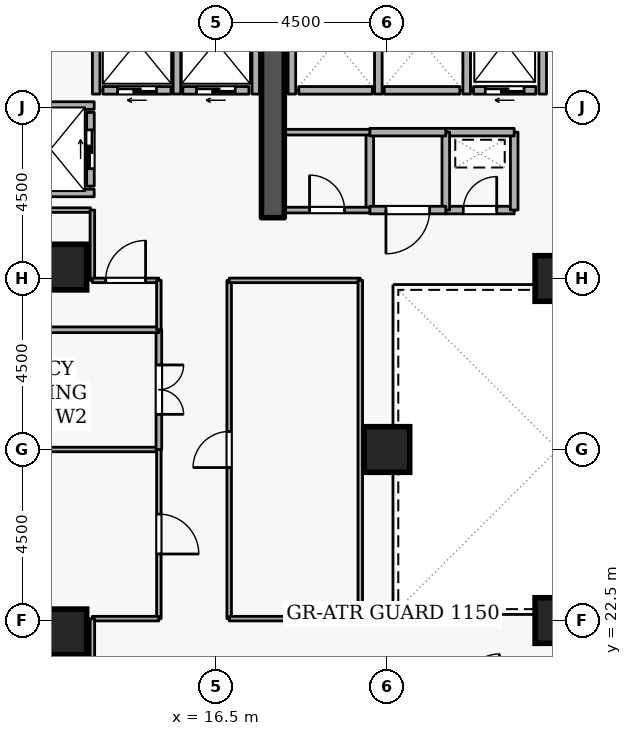
"""IFC4 building model, lengths in metres.
Left out: names, types, materials, properties, quantities, classifications, styles, units other than length and angle.
Written with IfcOpenShell. Run it as: python <this file> out.ifc"""

import sys

from ifc_helpers import new_model, si_unit, direction, frame, frame_2d, origin, origin_2d, place, context, subcontext, project, spatial, rectangle, extrude, element, fill, save


model = new_model("IFC4")
c1 = context("Model", 3, precision=1e-05, world=origin(), true_north=direction((0.0, 1.0)))
c2 = subcontext(c1, "Body", "Model", "MODEL_VIEW")
j1 = project(units=[si_unit("LENGTHUNIT", "METRE"), si_unit("PLANEANGLEUNIT", "RADIAN")], contexts=[c1])
p1 = place(None, origin())
s1 = spatial("IfcSite", under=j1, at=p1, CompositionType="ELEMENT")
p2 = place(p1, origin())
s2 = spatial("IfcBuilding", under=s1, at=p2, CompositionType="ELEMENT")
p3 = place(p2, frame((0.0, 0.0, 112.5)))
s3 = spatial("IfcBuildingStorey", under=s2, at=p3, CompositionType="ELEMENT", Elevation=112.5)
p4 = place(p3, frame((18.0, 33.1, 0.0), z_axis=(0.0, 0.0, 1.0), x_axis=(0.0, 1.0, 0.0)))
e1 = element("IfcWall", 1, at=p4, inside=s3, PredefinedType="SHEAR", context=c2, shape_type="SweptSolid", body=[
    extrude(rectangle(XDim=5.7, YDim=0.6, at=frame_2d((2.85, 0.0))), origin(), (0.0, 0.0, 1.0), 3.6),
])
for number, where, z_axis, x_axis in (
    (2, (12.5, 22.2, 0.0), (0.0, 0.0, 1.0), (1.0, 0.0, 0.0)),
    (3, (12.5, 31.8, 0.0), (0.0, 0.0, 1.0), (1.0, 0.0, 0.0)),
    (4, (25.5, 22.5, 0.0), (0.0, 0.0, 1.0), (1.0, 0.0, 0.0)),
    (5, (25.5, 31.5, 0.0), (0.0, 0.0, 1.0), (1.0, 0.0, 0.0)),
    (6, (21.0, 27.0, 0.0), (0.0, 0.0, 1.0), (1.0, 0.0, 0.0)),
):
    element("IfcColumn", number, at=place(p3, frame(where, z_axis=z_axis, x_axis=x_axis)), inside=s3, PredefinedType="COLUMN", context=c2, shape_type="SweptSolid", body=[
        extrude(rectangle(XDim=1.2, YDim=1.2, at=origin_2d()), origin(), (0.0, 0.0, 1.0), 3.6),
    ])
p5 = place(p3, frame((24.92, 36.45, 0.0), z_axis=(0.0, 0.0, 1.0), x_axis=(-1.0, 0.0, 0.0)))
e7 = element("IfcWall", 7, at=p5, inside=s3, PredefinedType="STANDARD", context=c2, shape_type="SweptSolid", body=[
    extrude(rectangle(XDim=1.64, YDim=0.2, at=frame_2d((0.82, 0.0))), origin(), (0.0, 0.0, 1.0), 3.34),
])
p6 = place(p5, frame((0.31, 0.0, 0.0)))
e8 = element("IfcOpeningElement", 8, at=p6, cuts=e7, PredefinedType="OPENING", context=c2, shape_type="SweptSolid", body=[
    extrude(rectangle(XDim=1.02, YDim=2.06, at=frame_2d((0.51, 1.03))), frame((0.0, 0.11, 0.0), z_axis=(0.0, -1.0, 0.0), x_axis=(1.0, 0.0, 0.0)), (0.0, 0.0, 1.0), 0.22),
])
p7 = place(p3, frame((22.92, 36.45, 0.0), z_axis=(0.0, 0.0, 1.0), x_axis=(-1.0, 0.0, 0.0)))
e9 = element("IfcWall", 9, at=p7, inside=s3, PredefinedType="STANDARD", context=c2, shape_type="SweptSolid", body=[
    extrude(rectangle(XDim=1.99, YDim=0.2, at=frame_2d((0.995, 0.0))), origin(), (0.0, 0.0, 1.0), 3.34),
])
p8 = place(p3, frame((20.62, 36.45, 0.0), z_axis=(0.0, 0.0, 1.0), x_axis=(-1.0, 0.0, 0.0)))
e10 = element("IfcWall", 10, at=p8, inside=s3, PredefinedType="STANDARD", context=c2, shape_type="SweptSolid", body=[
    extrude(rectangle(XDim=1.94, YDim=0.2, at=frame_2d((0.97, 0.0))), origin(), (0.0, 0.0, 1.0), 3.34),
])
p9 = place(p3, frame((17.37, 36.45, 0.0), z_axis=(0.0, 0.0, 1.0), x_axis=(-1.0, 0.0, 0.0)))
e11 = element("IfcWall", 11, at=p9, inside=s3, PredefinedType="STANDARD", context=c2, shape_type="SweptSolid", body=[
    extrude(rectangle(XDim=1.74, YDim=0.2, at=frame_2d((0.87, 0.0))), origin(), (0.0, 0.0, 1.0), 3.34),
])
p10 = place(p9, frame((0.36, 0.0, 0.0)))
e12 = element("IfcOpeningElement", 12, at=p10, cuts=e11, PredefinedType="OPENING", context=c2, shape_type="SweptSolid", body=[
    extrude(rectangle(XDim=1.02, YDim=2.06, at=frame_2d((0.51, 1.03))), frame((0.0, 0.11, 0.0), z_axis=(0.0, -1.0, 0.0), x_axis=(1.0, 0.0, 0.0)), (0.0, 0.0, 1.0), 0.22),
])
p11 = place(p3, frame((15.32, 36.45, 0.0), z_axis=(0.0, 0.0, 1.0), x_axis=(-1.0, 0.0, 0.0)))
e13 = element("IfcWall", 13, at=p11, inside=s3, PredefinedType="STANDARD", context=c2, shape_type="SweptSolid", body=[
    extrude(rectangle(XDim=1.79, YDim=0.2, at=frame_2d((0.895, 0.0))), origin(), (0.0, 0.0, 1.0), 3.34),
])
p12 = place(p11, frame((0.385, 0.0, 0.0)))
e14 = element("IfcOpeningElement", 14, at=p12, cuts=e13, PredefinedType="OPENING", context=c2, shape_type="SweptSolid", body=[
    extrude(rectangle(XDim=1.02, YDim=2.06, at=frame_2d((0.51, 1.03))), frame((0.0, 0.11, 0.0), z_axis=(0.0, -1.0, 0.0), x_axis=(1.0, 0.0, 0.0)), (0.0, 0.0, 1.0), 0.22),
])
p13 = place(p3, frame((13.2, 33.93, 0.0), z_axis=(0.0, 0.0, 1.0), x_axis=(0.0, 1.0, 0.0)))
e15 = element("IfcWall", 15, at=p13, inside=s3, PredefinedType="STANDARD", context=c2, shape_type="SweptSolid", body=[
    extrude(rectangle(XDim=1.94, YDim=0.2, at=frame_2d((0.97, 0.0))), origin(), (0.0, 0.0, 1.0), 3.34),
])
p14 = place(p13, frame((0.46, 0.0, 0.0)))
e16 = element("IfcOpeningElement", 16, at=p14, cuts=e15, PredefinedType="OPENING", context=c2, shape_type="SweptSolid", body=[
    extrude(rectangle(XDim=1.02, YDim=2.06, at=frame_2d((0.51, 1.03))), frame((0.0, 0.11, 0.0), z_axis=(0.0, -1.0, 0.0), x_axis=(1.0, 0.0, 0.0)), (0.0, 0.0, 1.0), 0.22),
])
for number, where, z_axis, x_axis in (
    (17, (25.1, 36.352, 0.0), (0.0, 0.0, 1.0), (0.0, 1.0, 0.0)),
    (18, (23.1, 36.352, 0.0), (0.0, 0.0, 1.0), (0.0, 1.0, 0.0)),
    (19, (20.775, 36.352, 0.0), (0.0, 0.0, 1.0), (0.0, 1.0, 0.0)),
    (20, (18.5, 36.352, 0.0), (0.0, 0.0, 1.0), (0.0, 1.0, 0.0)),
):
    element("IfcWall", number, at=place(p3, frame(where, z_axis=z_axis, x_axis=x_axis)), inside=s3, PredefinedType="STANDARD", context=c2, shape_type="SweptSolid", body=[
        extrude(rectangle(XDim=2.436, YDim=0.2, at=frame_2d((1.218, 0.0))), origin(), (0.0, 0.0, 1.0), 3.34),
    ])
p15 = place(p3, frame((17.55, 36.352, 0.0), z_axis=(0.0, 0.0, 1.0), x_axis=(0.0, 1.0, 0.0)))
e21 = element("IfcWall", 21, at=p15, inside=s3, PredefinedType="STANDARD", context=c2, shape_type="SweptSolid", body=[
    extrude(rectangle(XDim=2.636, YDim=0.2, at=frame_2d((1.318, 0.0))), origin(), (0.0, 0.0, 1.0), 2.545),
])
for number, where, z_axis, x_axis in (
    (22, (15.475, 36.352, 0.0), (0.0, 0.0, 1.0), (0.0, 1.0, 0.0)),
    (23, (13.35, 36.352, 0.0), (0.0, 0.0, 1.0), (0.0, 1.0, 0.0)),
):
    element("IfcWall", number, at=place(p3, frame(where, z_axis=z_axis, x_axis=x_axis)), inside=s3, PredefinedType="STANDARD", context=c2, shape_type="SweptSolid", body=[
        extrude(rectangle(XDim=2.636, YDim=0.2, at=frame_2d((1.318, 0.0))), origin(), (0.0, 0.0, 1.0), 3.34),
    ])
for number, where, z_axis, x_axis in (
    (24, (11.002, 36.05, 0.0), (0.0, 0.0, 1.0), (1.0, 0.0, 0.0)),
    (25, (11.002, 33.75, 0.0), (0.0, 0.0, 1.0), (1.0, 0.0, 0.0)),
):
    element("IfcWall", number, at=place(p3, frame(where, z_axis=z_axis, x_axis=x_axis)), inside=s3, PredefinedType="STANDARD", context=c2, shape_type="SweptSolid", body=[
        extrude(rectangle(XDim=2.296, YDim=0.2, at=frame_2d((1.148, 0.0))), origin(), (0.0, 0.0, 1.0), 3.34),
    ])
p16 = place(p3, frame((22.55, 33.3, 0.0), z_axis=(0.0, 0.0, 1.0), x_axis=(1.0, 0.0, 0.0)))
e26 = element("IfcWall", 26, at=p16, inside=s3, PredefinedType="STANDARD", context=c2, shape_type="SweptSolid", body=[
    extrude(rectangle(XDim=1.8, YDim=0.2, at=frame_2d((0.9, 0.0))), origin(), (0.0, 0.0, 1.0), 3.34),
])
p17 = place(p16, frame((0.46, 0.0, 0.0)))
e27 = element("IfcOpeningElement", 27, at=p17, cuts=e26, PredefinedType="OPENING", context=c2, shape_type="SweptSolid", body=[
    extrude(rectangle(XDim=0.88, YDim=2.04, at=frame_2d((0.44, 1.02))), frame((0.0, 0.11, 0.0), z_axis=(0.0, -1.0, 0.0), x_axis=(1.0, 0.0, 0.0)), (0.0, 0.0, 1.0), 0.22),
])
p18 = place(p3, frame((24.35, 33.3, 0.0), z_axis=(0.0, 0.0, 1.0), x_axis=(0.0, 1.0, 0.0)))
e28 = element("IfcWall", 28, at=p18, inside=s3, PredefinedType="STANDARD", context=c2, shape_type="SweptSolid", body=[
    extrude(rectangle(XDim=2.05, YDim=0.2, at=frame_2d((1.025, 0.0))), origin(), (0.0, 0.0, 1.0), 3.34),
])
p19 = place(p3, frame((24.35, 35.35, 0.0), z_axis=(0.0, 0.0, 1.0), x_axis=(-1.0, 0.0, 0.0)))
e29 = element("IfcWall", 29, at=p19, inside=s3, PredefinedType="STANDARD", context=c2, shape_type="SweptSolid", body=[
    extrude(rectangle(XDim=1.8, YDim=0.2, at=frame_2d((0.9, 0.0))), origin(), (0.0, 0.0, 1.0), 3.34),
])
for number, where, z_axis, x_axis in (
    (30, (22.55, 35.35, 0.0), (0.0, 0.0, 1.0), (0.0, -1.0, 0.0)),
    (31, (20.55, 33.3, 0.0), (0.0, 0.0, 1.0), (0.0, 1.0, 0.0)),
):
    element("IfcWall", number, at=place(p3, frame(where, z_axis=z_axis, x_axis=x_axis)), inside=s3, PredefinedType="STANDARD", context=c2, shape_type="SweptSolid", body=[
        extrude(rectangle(XDim=2.05, YDim=0.2, at=frame_2d((1.025, 0.0))), origin(), (0.0, 0.0, 1.0), 3.34),
    ])
p20 = place(p3, frame((20.55, 35.35, 0.0), z_axis=(0.0, 0.0, 1.0), x_axis=(1.0, 0.0, 0.0)))
e32 = element("IfcWall", 32, at=p20, inside=s3, PredefinedType="STANDARD", context=c2, shape_type="SweptSolid", body=[
    extrude(rectangle(XDim=2.0, YDim=0.2, at=frame_2d((1.0, 0.0))), origin(), (0.0, 0.0, 1.0), 3.34),
])
p21 = place(p3, frame((22.55, 33.3, 0.0), z_axis=(0.0, 0.0, 1.0), x_axis=(-1.0, 0.0, 0.0)))
e33 = element("IfcWall", 33, at=p21, inside=s3, PredefinedType="STANDARD", context=c2, shape_type="SweptSolid", body=[
    extrude(rectangle(XDim=2.0, YDim=0.2, at=frame_2d((1.0, 0.0))), origin(), (0.0, 0.0, 1.0), 3.34),
])
p22 = place(p21, frame((0.425, 0.0, 0.0)))
e34 = element("IfcOpeningElement", 34, at=p22, cuts=e33, PredefinedType="OPENING", context=c2, shape_type="SweptSolid", body=[
    extrude(rectangle(XDim=1.15, YDim=2.1, at=frame_2d((0.575, 1.05))), frame((0.0, 0.11, 0.0), z_axis=(0.0, -1.0, 0.0), x_axis=(1.0, 0.0, 0.0)), (0.0, 0.0, 1.0), 0.22),
])
p23 = place(p3, frame((18.3, 33.3, 0.0), z_axis=(0.0, 0.0, 1.0), x_axis=(1.0, 0.0, 0.0)))
e35 = element("IfcWall", 35, at=p23, inside=s3, PredefinedType="PARTITIONING", context=c2, shape_type="SweptSolid", body=[
    extrude(rectangle(XDim=2.25, YDim=0.15, at=frame_2d((1.125, 0.0))), origin(), (0.0, 0.0, 1.0), 3.34),
])
p24 = place(p23, frame((0.665, 0.0, 0.0)))
e36 = element("IfcOpeningElement", 36, at=p24, cuts=e35, PredefinedType="OPENING", context=c2, shape_type="SweptSolid", body=[
    extrude(rectangle(XDim=0.92, YDim=2.08, at=frame_2d((0.46, 1.04))), frame((0.0, 0.085, 0.0), z_axis=(0.0, -1.0, 0.0), x_axis=(1.0, 0.0, 0.0)), (0.0, 0.0, 1.0), 0.17),
])
p25 = place(p3, frame((20.55, 35.35, 0.0), z_axis=(0.0, 0.0, 1.0), x_axis=(-1.0, 0.0, 0.0)))
e37 = element("IfcWall", 37, at=p25, inside=s3, PredefinedType="PARTITIONING", context=c2, shape_type="SweptSolid", body=[
    extrude(rectangle(XDim=2.25, YDim=0.15, at=frame_2d((1.125, 0.0))), origin(), (0.0, 0.0, 1.0), 3.34),
])
p26 = place(p3, frame((8.2, 27.0, 0.0), z_axis=(0.0, 0.0, 1.0), x_axis=(1.0, 0.0, 0.0)))
e38 = element("IfcWall", 38, at=p26, inside=s3, PredefinedType="PARTITIONING", context=c2, shape_type="SweptSolid", body=[
    extrude(rectangle(XDim=6.8, YDim=0.12, at=frame_2d((3.4, 0.0))), origin(), (0.0, 0.0, 1.0), 2.882),
])
p27 = place(p3, frame((15.0, 27.0, 0.0), z_axis=(0.0, 0.0, 1.0), x_axis=(0.0, -1.0, 0.0)))
e39 = element("IfcWall", 39, at=p27, inside=s3, PredefinedType="PARTITIONING", context=c2, shape_type="SweptSolid", body=[
    extrude(rectangle(XDim=4.45, YDim=0.12, at=frame_2d((2.225, 0.0))), origin(), (0.0, 0.0, 1.0), 3.34),
])
p28 = place(p27, frame((1.7, 0.0, 0.0)))
e40 = element("IfcOpeningElement", 40, at=p28, cuts=e39, PredefinedType="OPENING", context=c2, shape_type="SweptSolid", body=[
    extrude(rectangle(XDim=1.05, YDim=2.1, at=frame_2d((0.525, 1.05))), frame((0.0, 0.07, 0.0), z_axis=(0.0, -1.0, 0.0), x_axis=(1.0, 0.0, 0.0)), (0.0, 0.0, 1.0), 0.14),
])
p29 = place(p3, frame((15.0, 22.55, 0.0), z_axis=(0.0, 0.0, 1.0), x_axis=(-1.0, 0.0, 0.0)))
e41 = element("IfcWall", 41, at=p29, inside=s3, PredefinedType="PARTITIONING", context=c2, shape_type="SweptSolid", body=[
    extrude(rectangle(XDim=1.75, YDim=0.12, at=frame_2d((0.875, 0.0))), origin(), (0.0, 0.0, 1.0), 3.34),
])
p30 = place(p3, frame((13.25, 22.55, 0.0), z_axis=(0.0, 0.0, 1.0), x_axis=(0.0, -1.0, 0.0)))
e42 = element("IfcWall", 42, at=p30, inside=s3, PredefinedType="PARTITIONING", context=c2, shape_type="SweptSolid", body=[
    extrude(rectangle(XDim=1.85, YDim=0.12, at=frame_2d((0.925, 0.0))), origin(), (0.0, 0.0, 1.0), 3.34),
])
p31 = place(p3, frame((15.0, 30.15, 0.0), z_axis=(0.0, 0.0, 1.0), x_axis=(0.0, -1.0, 0.0)))
e43 = element("IfcWall", 43, at=p31, inside=s3, PredefinedType="PARTITIONING", context=c2, shape_type="SweptSolid", body=[
    extrude(rectangle(XDim=3.15, YDim=0.15, at=frame_2d((1.575, 0.0))), origin(), (0.0, 0.0, 1.0), 3.34),
])
p32 = place(p31, frame((0.925, 0.0, 0.0)))
e44 = element("IfcOpeningElement", 44, at=p32, cuts=e43, PredefinedType="OPENING", context=c2, shape_type="SweptSolid", body=[
    extrude(rectangle(XDim=1.3, YDim=2.12, at=frame_2d((0.65, 1.06))), frame((0.0, 0.085, 0.0), z_axis=(0.0, -1.0, 0.0), x_axis=(1.0, 0.0, 0.0)), (0.0, 0.0, 1.0), 0.17),
])
p33 = place(p3, frame((1.58, 30.15, 0.0), z_axis=(0.0, 0.0, 1.0), x_axis=(1.0, 0.0, 0.0)))
e45 = element("IfcWall", 45, at=p33, inside=s3, PredefinedType="PARTITIONING", context=c2, shape_type="SweptSolid", body=[
    extrude(rectangle(XDim=13.42, YDim=0.15, at=frame_2d((6.71, 0.0))), origin(), (0.0, 0.0, 1.0), 3.34),
])
p34 = place(p3, frame((10.9, 33.3, 0.0), z_axis=(0.0, 0.0, 1.0), x_axis=(1.0, 0.0, 0.0)))
e46 = element("IfcWall", 46, at=p34, inside=s3, PredefinedType="PARTITIONING", context=c2, shape_type="SweptSolid", body=[
    extrude(rectangle(XDim=2.3, YDim=0.12, at=frame_2d((1.15, 0.0))), origin(), (0.0, 0.0, 1.0), 3.34),
])
p35 = place(p3, frame((13.25, 33.3, 0.0), z_axis=(0.0, 0.0, 1.0), x_axis=(0.0, -1.0, 0.0)))
e47 = element("IfcWall", 47, at=p35, inside=s3, PredefinedType="PARTITIONING", context=c2, shape_type="SweptSolid", body=[
    extrude(rectangle(XDim=1.85, YDim=0.12, at=frame_2d((0.925, 0.0))), origin(), (0.0, 0.0, 1.0), 3.34),
])
p36 = place(p3, frame((13.25, 31.45, 0.0), z_axis=(0.0, 0.0, 1.0), x_axis=(1.0, 0.0, 0.0)))
e48 = element("IfcWall", 48, at=p36, inside=s3, PredefinedType="PARTITIONING", context=c2, shape_type="SweptSolid", body=[
    extrude(rectangle(XDim=1.75, YDim=0.12, at=frame_2d((0.875, 0.0))), origin(), (0.0, 0.0, 1.0), 3.34),
])
p37 = place(p36, frame((0.35, 0.0, 0.0)))
e49 = element("IfcOpeningElement", 49, at=p37, cuts=e48, PredefinedType="OPENING", context=c2, shape_type="SweptSolid", body=[
    extrude(rectangle(XDim=1.05, YDim=2.1, at=frame_2d((0.525, 1.05))), frame((0.0, 0.07, 0.0), z_axis=(0.0, -1.0, 0.0), x_axis=(1.0, 0.0, 0.0)), (0.0, 0.0, 1.0), 0.14),
])
p38 = place(p3, frame((15.0, 31.45, 0.0), z_axis=(0.0, 0.0, 1.0), x_axis=(0.0, -1.0, 0.0)))
e50 = element("IfcWall", 50, at=p38, inside=s3, PredefinedType="PARTITIONING", context=c2, shape_type="SweptSolid", body=[
    extrude(rectangle(XDim=1.3, YDim=0.12, at=frame_2d((0.65, 0.0))), origin(), (0.0, 0.0, 1.0), 3.34),
])
p39 = place(p3, frame((16.85, 22.55, 0.0), z_axis=(0.0, 0.0, 1.0), x_axis=(0.0, 1.0, 0.0)))
e51 = element("IfcWall", 51, at=p39, inside=s3, PredefinedType="PARTITIONING", context=c2, shape_type="SweptSolid", body=[
    extrude(rectangle(XDim=8.9, YDim=0.12, at=frame_2d((4.45, 0.0))), origin(), (0.0, 0.0, 1.0), 3.34),
])
p40 = place(p39, frame((3.975, 0.0, 0.0)))
e52 = element("IfcOpeningElement", 52, at=p40, cuts=e51, PredefinedType="OPENING", context=c2, shape_type="SweptSolid", body=[
    extrude(rectangle(XDim=0.95, YDim=2.1, at=frame_2d((0.475, 1.05))), frame((0.0, 0.07, 0.0), z_axis=(0.0, -1.0, 0.0), x_axis=(1.0, 0.0, 0.0)), (0.0, 0.0, 1.0), 0.14),
])
p41 = place(p3, frame((16.85, 31.45, 0.0), z_axis=(0.0, 0.0, 1.0), x_axis=(1.0, 0.0, 0.0)))
e53 = element("IfcWall", 53, at=p41, inside=s3, PredefinedType="PARTITIONING", context=c2, shape_type="SweptSolid", body=[
    extrude(rectangle(XDim=3.45, YDim=0.12, at=frame_2d((1.725, 0.0))), origin(), (0.0, 0.0, 1.0), 3.34),
])
p42 = place(p3, frame((20.3, 31.45, 0.0), z_axis=(0.0, 0.0, 1.0), x_axis=(0.0, -1.0, 0.0)))
e54 = element("IfcWall", 54, at=p42, inside=s3, PredefinedType="PARTITIONING", context=c2, shape_type="SweptSolid", body=[
    extrude(rectangle(XDim=8.9, YDim=0.12, at=frame_2d((4.45, 0.0))), origin(), (0.0, 0.0, 1.0), 3.34),
])
p43 = place(p3, frame((20.3, 22.55, 0.0), z_axis=(0.0, 0.0, 1.0), x_axis=(-1.0, 0.0, 0.0)))
e55 = element("IfcWall", 55, at=p43, inside=s3, PredefinedType="PARTITIONING", context=c2, shape_type="SweptSolid", body=[
    extrude(rectangle(XDim=3.45, YDim=0.12, at=frame_2d((1.725, 0.0))), origin(), (0.0, 0.0, 1.0), 3.34),
])
p44 = place(p6, origin())
e56 = element("IfcDoor", 56, at=p44, inside=s3, OperationType="SLIDING_TO_LEFT", PredefinedType="DOOR", context=c2, shape_type="SweptSolid", body=[
    extrude(rectangle(XDim=1.02, YDim=2.06, at=frame_2d((0.51, 1.03))), frame((0.0, 0.025, 0.0), z_axis=(0.0, -1.0, 0.0), x_axis=(1.0, 0.0, 0.0)), (0.0, 0.0, 1.0), 0.05),
])
fill(e8, e56)
p45 = place(p10, origin())
e57 = element("IfcDoor", 57, at=p45, inside=s3, OperationType="SLIDING_TO_LEFT", PredefinedType="DOOR", context=c2, shape_type="SweptSolid", body=[
    extrude(rectangle(XDim=1.02, YDim=2.06, at=frame_2d((0.51, 1.03))), frame((0.0, 0.025, 0.0), z_axis=(0.0, -1.0, 0.0), x_axis=(1.0, 0.0, 0.0)), (0.0, 0.0, 1.0), 0.05),
])
fill(e12, e57)
p46 = place(p12, origin())
e58 = element("IfcDoor", 58, at=p46, inside=s3, OperationType="SLIDING_TO_LEFT", PredefinedType="DOOR", context=c2, shape_type="SweptSolid", body=[
    extrude(rectangle(XDim=1.02, YDim=2.06, at=frame_2d((0.51, 1.03))), frame((0.0, 0.025, 0.0), z_axis=(0.0, -1.0, 0.0), x_axis=(1.0, 0.0, 0.0)), (0.0, 0.0, 1.0), 0.05),
])
fill(e14, e58)
p47 = place(p14, origin())
e59 = element("IfcDoor", 59, at=p47, inside=s3, OperationType="SLIDING_TO_LEFT", PredefinedType="DOOR", context=c2, shape_type="SweptSolid", body=[
    extrude(rectangle(XDim=1.02, YDim=2.06, at=frame_2d((0.51, 1.03))), frame((0.0, 0.025, 0.0), z_axis=(0.0, -1.0, 0.0), x_axis=(1.0, 0.0, 0.0)), (0.0, 0.0, 1.0), 0.05),
])
fill(e16, e59)
p48 = place(p17, origin())
e60 = element("IfcDoor", 60, at=p48, inside=s3, OperationType="SINGLE_SWING_RIGHT", PredefinedType="DOOR", context=c2, shape_type="SweptSolid", body=[
    extrude(rectangle(XDim=0.88, YDim=2.04, at=frame_2d((0.44, 1.02))), frame((0.0, 0.025, 0.0), z_axis=(0.0, -1.0, 0.0), x_axis=(1.0, 0.0, 0.0)), (0.0, 0.0, 1.0), 0.05),
])
fill(e27, e60)
p49 = place(p24, origin())
e61 = element("IfcDoor", 61, at=p49, inside=s3, OperationType="SINGLE_SWING_LEFT", PredefinedType="DOOR", context=c2, shape_type="SweptSolid", body=[
    extrude(rectangle(XDim=0.92, YDim=2.08, at=frame_2d((0.46, 1.04))), frame((0.0, 0.025, 0.0), z_axis=(0.0, -1.0, 0.0), x_axis=(1.0, 0.0, 0.0)), (0.0, 0.0, 1.0), 0.05),
])
fill(e36, e61)
p50 = place(p22, origin())
e62 = element("IfcDoor", 62, at=p50, inside=s3, OperationType="SINGLE_SWING_RIGHT", PredefinedType="DOOR", context=c2, shape_type="SweptSolid", body=[
    extrude(rectangle(XDim=1.15, YDim=2.1, at=frame_2d((0.575, 1.05))), frame((0.0, 0.025, 0.0), z_axis=(0.0, -1.0, 0.0), x_axis=(1.0, 0.0, 0.0)), (0.0, 0.0, 1.0), 0.05),
])
fill(e34, e62)
p51 = place(p28, origin())
e63 = element("IfcDoor", 63, at=p51, inside=s3, OperationType="SINGLE_SWING_RIGHT", PredefinedType="DOOR", context=c2, shape_type="SweptSolid", body=[
    extrude(rectangle(XDim=1.05, YDim=2.1, at=frame_2d((0.525, 1.05))), frame((0.0, 0.025, 0.0), z_axis=(0.0, -1.0, 0.0), x_axis=(1.0, 0.0, 0.0)), (0.0, 0.0, 1.0), 0.05),
])
fill(e40, e63)
p52 = place(p32, origin())
e64 = element("IfcDoor", 64, at=p52, inside=s3, OperationType="DOUBLE_DOOR_SINGLE_SWING", PredefinedType="DOOR", context=c2, shape_type="SweptSolid", body=[
    extrude(rectangle(XDim=1.3, YDim=2.12, at=frame_2d((0.65, 1.06))), frame((0.0, 0.025, 0.0), z_axis=(0.0, -1.0, 0.0), x_axis=(1.0, 0.0, 0.0)), (0.0, 0.0, 1.0), 0.05),
])
fill(e44, e64)
p53 = place(p37, origin())
e65 = element("IfcDoor", 65, at=p53, inside=s3, OperationType="SINGLE_SWING_RIGHT", PredefinedType="DOOR", context=c2, shape_type="SweptSolid", body=[
    extrude(rectangle(XDim=1.05, YDim=2.1, at=frame_2d((0.525, 1.05))), frame((0.0, 0.025, 0.0), z_axis=(0.0, -1.0, 0.0), x_axis=(1.0, 0.0, 0.0)), (0.0, 0.0, 1.0), 0.05),
])
fill(e49, e65)
p54 = place(p40, origin())
e66 = element("IfcDoor", 66, at=p54, inside=s3, OperationType="SINGLE_SWING_LEFT", PredefinedType="DOOR", context=c2, shape_type="SweptSolid", body=[
    extrude(rectangle(XDim=0.95, YDim=2.1, at=frame_2d((0.475, 1.05))), frame((0.0, 0.025, 0.0), z_axis=(0.0, -1.0, 0.0), x_axis=(1.0, 0.0, 0.0)), (0.0, 0.0, 1.0), 0.05),
])
fill(e52, e66)
save(model, sys.argv[1])
